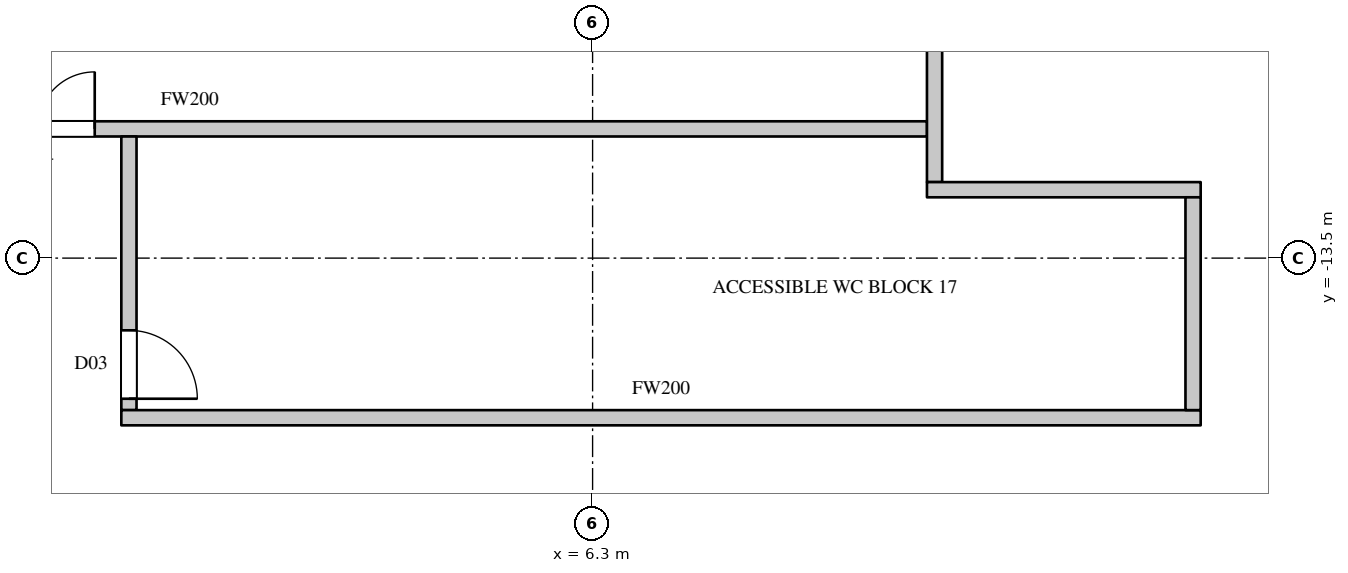
"""IFC4 building model, lengths in metres.
Left out: names, types, materials, properties, quantities, classifications, styles, units other than length and angle.
Written with IfcOpenShell. Run it as: python <this file> out.ifc"""

import sys

from ifc_helpers import new_model, si_unit, direction, frame, frame_2d, origin, place, context, subcontext, project, spatial, rectangle, extrude, element, fill, save


model = new_model("IFC4")
c1 = context("Model", 3, precision=1e-05, world=origin(), true_north=direction((0.0, 1.0)))
c2 = subcontext(c1, "Body", "Model", "MODEL_VIEW")
j1 = project(units=[si_unit("LENGTHUNIT", "METRE"), si_unit("PLANEANGLEUNIT", "RADIAN")], contexts=[c1])
p1 = place(None, origin())
s1 = spatial("IfcSite", under=j1, at=p1, CompositionType="ELEMENT")
p2 = place(p1, origin())
s2 = spatial("IfcBuilding", under=s1, at=p2, CompositionType="ELEMENT")
p3 = place(p2, frame((0.0, 0.0, 91.5)))
s3 = spatial("IfcBuildingStorey", under=s2, at=p3, CompositionType="ELEMENT", Elevation=91.5)
p4 = place(p3, frame((-8.7, -11.8, 0.0), z_axis=(0.0, 0.0, 1.0), x_axis=(1.0, 0.0, 0.0)))
e1 = element("IfcWall", 1, at=p4, inside=s3, PredefinedType="PARTITIONING", context=c2, shape_type="SweptSolid", body=[
    extrude(rectangle(XDim=19.4, YDim=0.2, at=frame_2d((9.7, 0.0))), origin(), (0.0, 0.0, 1.0), 3.3),
])
p5 = place(p4, frame((6.95, 0.0, 0.0)))
e2 = element("IfcOpeningElement", 2, at=p5, cuts=e1, PredefinedType="OPENING", context=c2, shape_type="SweptSolid", body=[
    extrude(rectangle(XDim=1.5, YDim=2.2, at=frame_2d((0.75, 1.1))), frame((0.0, 0.11, 0.0), z_axis=(0.0, -1.0, 0.0), x_axis=(1.0, 0.0, 0.0)), (0.0, 0.0, 1.0), 0.22),
])
p6 = place(p3, frame((0.2, -15.5, 0.0), z_axis=(0.0, 0.0, 1.0), x_axis=(0.0, 1.0, 0.0)))
e3 = element("IfcWall", 3, at=p6, inside=s3, PredefinedType="PARTITIONING", context=c2, shape_type="SweptSolid", body=[
    extrude(rectangle(XDim=3.6, YDim=0.2, at=frame_2d((1.8, 0.0))), origin(), (0.0, 0.0, 1.0), 3.3),
])
p7 = place(p6, frame((0.15, 0.0, 0.0)))
e4 = element("IfcOpeningElement", 4, at=p7, cuts=e3, PredefinedType="OPENING", context=c2, shape_type="SweptSolid", body=[
    extrude(rectangle(XDim=0.9, YDim=2.2, at=frame_2d((0.45, 1.1))), frame((0.0, 0.11, 0.0), z_axis=(0.0, -1.0, 0.0), x_axis=(1.0, 0.0, 0.0)), (0.0, 0.0, 1.0), 0.22),
])
p8 = place(p3, frame((0.1, -15.6, 0.0), z_axis=(0.0, 0.0, 1.0), x_axis=(1.0, 0.0, 0.0)))
e5 = element("IfcWall", 5, at=p8, inside=s3, PredefinedType="PARTITIONING", context=c2, shape_type="SweptSolid", body=[
    extrude(rectangle(XDim=14.2, YDim=0.2, at=frame_2d((7.1, 0.0))), origin(), (0.0, 0.0, 1.0), 3.3),
])
p9 = place(p3, frame((10.799, -12.5, 0.0), z_axis=(0.0, 0.0, 1.0), x_axis=(0.0, 1.0, 0.0)))
e6 = element("IfcWall", 6, at=p9, inside=s3, PredefinedType="PARTITIONING", context=c2, shape_type="SweptSolid", body=[
    extrude(rectangle(XDim=24.2, YDim=0.2, at=frame_2d((12.1, 0.0))), origin(), (0.0, 0.0, 1.0), 3.3),
])
p10 = place(p9, frame((13.15, 0.0, 0.0)))
e7 = element("IfcOpeningElement", 7, at=p10, cuts=e6, PredefinedType="OPENING", context=c2, shape_type="SweptSolid", body=[
    extrude(rectangle(XDim=1.5, YDim=2.2, at=frame_2d((0.75, 1.1))), frame((0.0, 0.11, 0.0), z_axis=(0.0, -1.0, 0.0), x_axis=(1.0, 0.0, 0.0)), (0.0, 0.0, 1.0), 0.22),
])
p11 = place(p3, frame((10.699, -12.6, 0.0), z_axis=(0.0, 0.0, 1.0), x_axis=(1.0, 0.0, 0.0)))
e8 = element("IfcWall", 8, at=p11, inside=s3, PredefinedType="PARTITIONING", context=c2, shape_type="SweptSolid", body=[
    extrude(rectangle(XDim=3.601, YDim=0.2, at=frame_2d((1.801, 0.0))), origin(), (0.0, 0.0, 1.0), 3.3),
])
p12 = place(p3, frame((14.2, -15.5, 0.0), z_axis=(0.0, 0.0, 1.0), x_axis=(0.0, 1.0, 0.0)))
e9 = element("IfcWall", 9, at=p12, inside=s3, PredefinedType="PARTITIONING", context=c2, shape_type="SweptSolid", body=[
    extrude(rectangle(XDim=2.8, YDim=0.2, at=frame_2d((1.4, 0.0))), origin(), (0.0, 0.0, 1.0), 3.3),
])
p13 = place(p5, origin())
e10 = element("IfcDoor", 10, at=p13, inside=s3, OperationType="DOUBLE_DOOR_SINGLE_SWING", PredefinedType="DOOR", context=c2, shape_type="SweptSolid", body=[
    extrude(rectangle(XDim=1.5, YDim=2.2, at=frame_2d((0.75, 1.1))), frame((0.0, 0.025, 0.0), z_axis=(0.0, -1.0, 0.0), x_axis=(1.0, 0.0, 0.0)), (0.0, 0.0, 1.0), 0.05),
])
fill(e2, e10)
p14 = place(p7, origin())
e11 = element("IfcDoor", 11, at=p14, inside=s3, OperationType="SINGLE_SWING_RIGHT", PredefinedType="DOOR", context=c2, shape_type="SweptSolid", body=[
    extrude(rectangle(XDim=0.9, YDim=2.2, at=frame_2d((0.45, 1.1))), frame((0.0, 0.025, 0.0), z_axis=(0.0, -1.0, 0.0), x_axis=(1.0, 0.0, 0.0)), (0.0, 0.0, 1.0), 0.05),
])
fill(e4, e11)
save(model, sys.argv[1])
